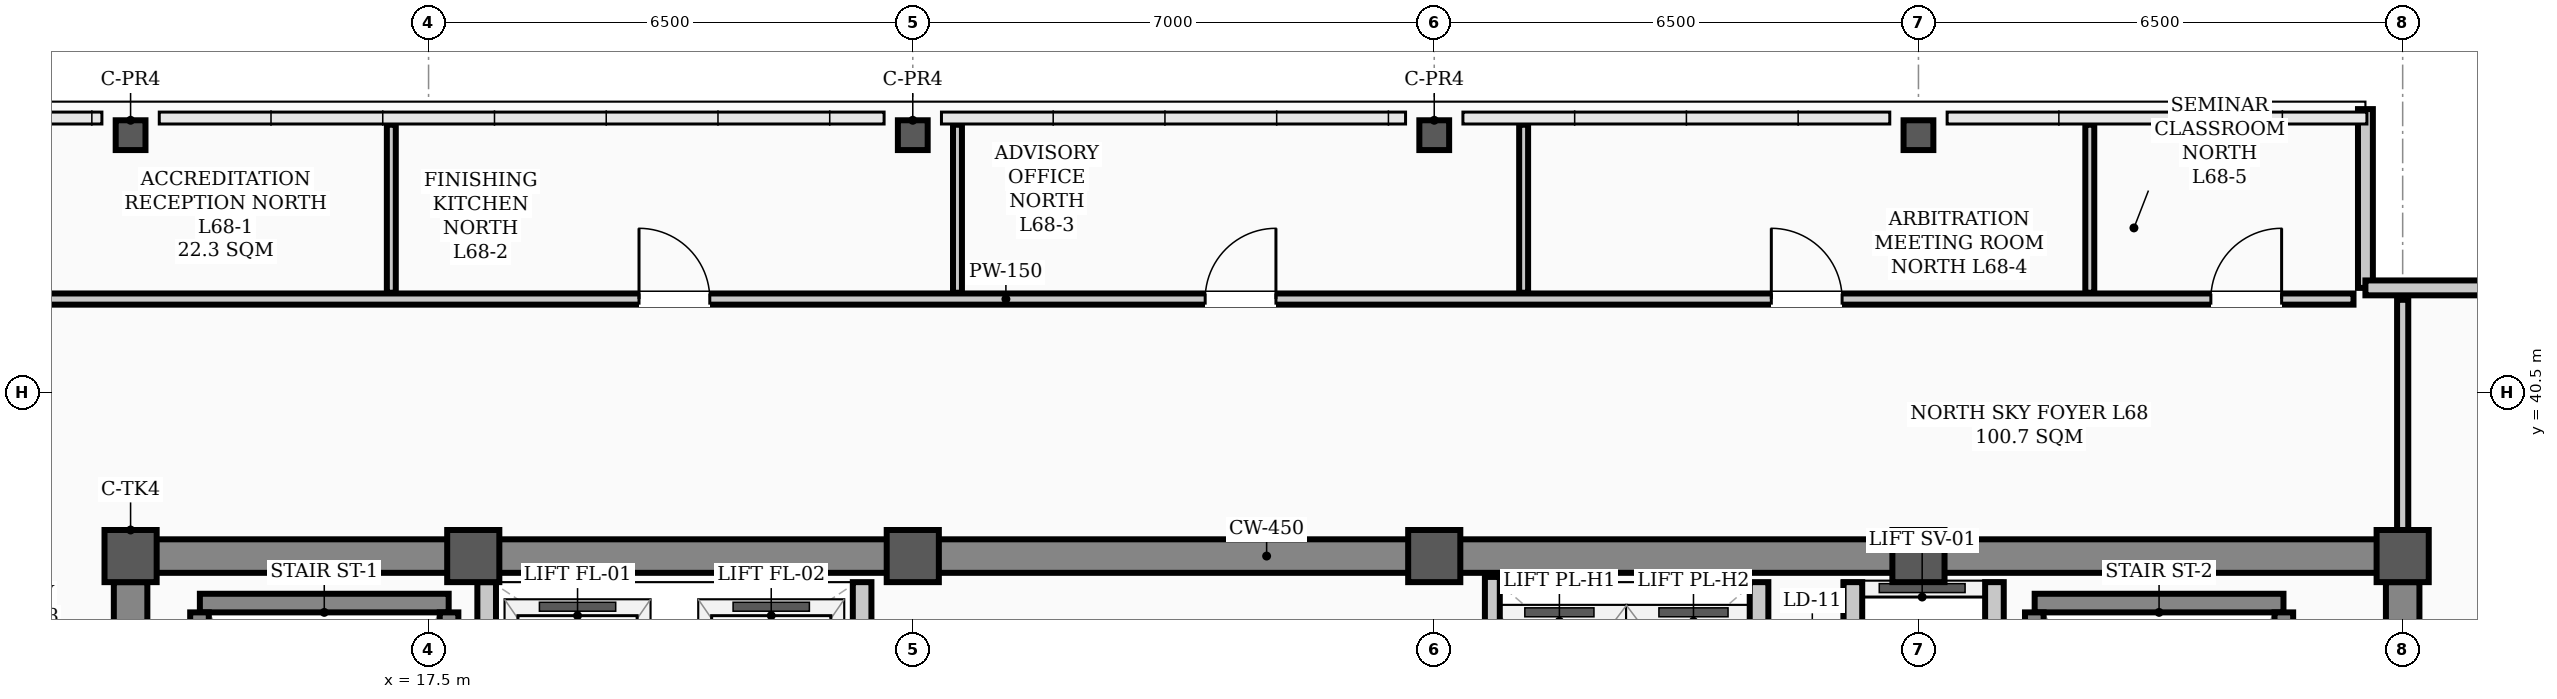
"""IFC4 building model, lengths in metres.
Left out: names, types, materials, properties, quantities, classifications, styles, units other than length and angle.
Written with IfcOpenShell. Run it as: python <this file> out.ifc"""

import sys

from ifc_helpers import new_model, si_unit, direction, frame, frame_2d, origin, origin_2d, place, context, subcontext, project, spatial, rectangle, hollow_rectangle, extrude, element, fill, save


model = new_model("IFC4")
c1 = context("Model", 3, precision=1e-05, world=origin(), true_north=direction((0.0, 1.0)))
c2 = subcontext(c1, "Body", "Model", "MODEL_VIEW")
j1 = project(units=[si_unit("LENGTHUNIT", "METRE"), si_unit("PLANEANGLEUNIT", "RADIAN")], contexts=[c1])
p1 = place(None, origin())
s1 = spatial("IfcSite", under=j1, at=p1, CompositionType="ELEMENT")
p2 = place(p1, origin())
s2 = spatial("IfcBuilding", under=s1, at=p2, CompositionType="ELEMENT")
p3 = place(p2, frame((0.0, 0.0, 273.5)))
s3 = spatial("IfcBuildingStorey", under=s2, at=p3, CompositionType="ELEMENT", Elevation=273.5)
for number, where, z_axis, x_axis in (
    (1, (13.5, 38.3, 0.0), (0.0, 0.0, 1.0), (1.0, 0.0, 0.0)),
    (2, (18.1, 38.3, 0.0), (0.0, 0.0, 1.0), (1.0, 0.0, 0.0)),
    (3, (24.0, 38.3, 0.0), (0.0, 0.0, 1.0), (1.0, 0.0, 0.0)),
    (4, (31.0, 38.3, 0.0), (0.0, 0.0, 1.0), (1.0, 0.0, 0.0)),
    (5, (37.5, 38.3, 0.0), (0.0, 0.0, 1.0), (1.0, 0.0, 0.0)),
    (6, (44.0, 38.3, 0.0), (0.0, 0.0, 1.0), (1.0, 0.0, 0.0)),
):
    element("IfcColumn", number, at=place(p3, frame(where, z_axis=z_axis, x_axis=x_axis)), inside=s3, PredefinedType="COLUMN", context=c2, shape_type="SweptSolid", body=[
        extrude(hollow_rectangle(XDim=0.7, YDim=0.7, WallThickness=0.028, InnerFilletRadius=0.014, OuterFilletRadius=0.042, at=origin_2d()), origin(), (0.0, 0.0, 1.0), 3.9),
    ])
for number, where, z_axis, x_axis in (
    (7, (13.5, 43.95, 0.0), (0.0, 0.0, 1.0), (1.0, 0.0, 0.0)),
    (8, (24.0, 43.95, 0.0), (0.0, 0.0, 1.0), (1.0, 0.0, 0.0)),
    (9, (31.0, 43.95, 0.0), (0.0, 0.0, 1.0), (1.0, 0.0, 0.0)),
    (10, (37.5, 43.95, 0.0), (0.0, 0.0, 1.0), (1.0, 0.0, 0.0)),
):
    element("IfcColumn", number, at=place(p3, frame(where, z_axis=z_axis, x_axis=x_axis)), inside=s3, PredefinedType="COLUMN", context=c2, shape_type="SweptSolid", body=[
        extrude(hollow_rectangle(XDim=0.4, YDim=0.4, WallThickness=0.02, InnerFilletRadius=0.02, OuterFilletRadius=0.04, at=origin_2d()), origin(), (0.0, 0.0, 1.0), 3.9),
    ])
p4 = place(p3, frame((43.5, 44.3, 0.0), z_axis=(0.0, 0.0, 1.0), x_axis=(0.0, -1.0, 0.0)))
e11 = element("IfcWall", 11, at=p4, inside=s3, PredefinedType="PARAPET", context=c2, shape_type="SweptSolid", body=[
    extrude(rectangle(XDim=2.4, YDim=0.2, at=frame_2d((1.2, 0.0))), origin(), (0.0, 0.0, 1.0), 1.2),
])
p5 = place(p3, frame((43.5, 41.9, 0.0), z_axis=(0.0, 0.0, 1.0), x_axis=(1.0, 0.0, 0.0)))
e12 = element("IfcWall", 12, at=p5, inside=s3, PredefinedType="PARAPET", context=c2, shape_type="SweptSolid", body=[
    extrude(rectangle(XDim=2.4, YDim=0.2, at=frame_2d((1.2, 0.0))), origin(), (0.0, 0.0, 1.0), 1.2),
])
p6 = place(p3, frame((13.5, 38.3, 0.0), z_axis=(0.0, 0.0, 1.0), x_axis=(1.0, 0.0, 0.0)))
e13 = element("IfcWall", 13, at=p6, inside=s3, PredefinedType="SHEAR", context=c2, shape_type="SweptSolid", body=[
    extrude(rectangle(XDim=30.5, YDim=0.45, at=frame_2d((15.25, 0.0))), origin(), (0.0, 0.0, 1.0), 3.72),
])
for number, where, z_axis, x_axis in (
    (14, (13.5, 29.35, 0.0), (0.0, 0.0, 1.0), (0.0, 1.0, 0.0)),
    (15, (44.0, 29.35, 0.0), (0.0, 0.0, 1.0), (0.0, 1.0, 0.0)),
):
    element("IfcWall", number, at=place(p3, frame(where, z_axis=z_axis, x_axis=x_axis)), inside=s3, PredefinedType="SHEAR", context=c2, shape_type="SweptSolid", body=[
        extrude(rectangle(XDim=8.6, YDim=0.45, at=frame_2d((4.3, 0.0))), origin(), (0.0, 0.0, 1.0), 3.72),
    ])
p7 = place(p3, frame((14.43, 37.669, 0.0), z_axis=(0.0, 0.0, 1.0), x_axis=(1.0, 0.0, 0.0)))
e16 = element("IfcWall", 16, at=p7, inside=s3, PredefinedType="STANDARD", context=c2, shape_type="SweptSolid", body=[
    extrude(rectangle(XDim=3.34, YDim=0.25, at=frame_2d((1.67, 0.0))), origin(), (0.0, 0.0, 1.0), 3.72),
])
for number, where, z_axis, x_axis in (
    (17, (14.425, 30.36, 0.0), (0.0, 0.0, 1.0), (0.0, 1.0, 0.0)),
    (18, (17.775, 30.36, 0.0), (0.0, 0.0, 1.0), (0.0, 1.0, 0.0)),
):
    element("IfcWall", number, at=place(p3, frame(where, z_axis=z_axis, x_axis=x_axis)), inside=s3, PredefinedType="STANDARD", context=c2, shape_type="SweptSolid", body=[
        extrude(rectangle(XDim=7.184, YDim=0.25, at=frame_2d((3.592, 0.0))), origin(), (0.0, 0.0, 1.0), 3.72),
    ])
p8 = place(p3, frame((39.06, 37.669, 0.0), z_axis=(0.0, 0.0, 1.0), x_axis=(1.0, 0.0, 0.0)))
e19 = element("IfcWall", 19, at=p8, inside=s3, PredefinedType="STANDARD", context=c2, shape_type="SweptSolid", body=[
    extrude(rectangle(XDim=3.34, YDim=0.25, at=frame_2d((1.67, 0.0))), origin(), (0.0, 0.0, 1.0), 3.72),
])
for number, where, z_axis, x_axis in (
    (20, (39.055, 30.36, 0.0), (0.0, 0.0, 1.0), (0.0, 1.0, 0.0)),
    (21, (42.405, 30.36, 0.0), (0.0, 0.0, 1.0), (0.0, 1.0, 0.0)),
):
    element("IfcWall", number, at=place(p3, frame(where, z_axis=z_axis, x_axis=x_axis)), inside=s3, PredefinedType="STANDARD", context=c2, shape_type="SweptSolid", body=[
        extrude(rectangle(XDim=7.184, YDim=0.25, at=frame_2d((3.592, 0.0))), origin(), (0.0, 0.0, 1.0), 3.72),
    ])
p9 = place(p3, frame((36.62, 31.95, 0.0), z_axis=(0.0, 0.0, 1.0), x_axis=(0.0, 1.0, 0.0)))
e22 = element("IfcWall", 22, at=p9, inside=s3, PredefinedType="STANDARD", context=c2, shape_type="SweptSolid", body=[
    extrude(rectangle(XDim=6.0, YDim=0.25, at=frame_2d((3.0, 0.0))), origin(), (0.0, 0.0, 1.0), 3.4),
])
p10 = place(p9, frame((0.9, 0.0, 0.0)))
e23 = element("IfcOpeningElement", 23, at=p10, cuts=e22, PredefinedType="OPENING", context=c2, shape_type="SweptSolid", body=[
    extrude(rectangle(XDim=1.1, YDim=2.08, at=frame_2d((0.55, 1.04))), frame((0.0, 0.135, 0.0), z_axis=(0.0, -1.0, 0.0), x_axis=(1.0, 0.0, 0.0)), (0.0, 0.0, 1.0), 0.27),
])
p11 = place(p9, frame((4.0, 0.0, 0.0)))
e24 = element("IfcOpeningElement", 24, at=p11, cuts=e22, PredefinedType="OPENING", context=c2, shape_type="SweptSolid", body=[
    extrude(rectangle(XDim=1.1, YDim=2.08, at=frame_2d((0.55, 1.04))), frame((0.0, 0.135, 0.0), z_axis=(0.0, -1.0, 0.0), x_axis=(1.0, 0.0, 0.0)), (0.0, 0.0, 1.0), 0.27),
])
p12 = place(p3, frame((38.52, 31.95, 0.0), z_axis=(0.0, 0.0, 1.0), x_axis=(0.0, 1.0, 0.0)))
e25 = element("IfcWall", 25, at=p12, inside=s3, PredefinedType="STANDARD", context=c2, shape_type="SweptSolid", body=[
    extrude(rectangle(XDim=6.0, YDim=0.25, at=frame_2d((3.0, 0.0))), origin(), (0.0, 0.0, 1.0), 3.48),
])
for number, where, z_axis, x_axis in (
    (26, (18.28, 34.62, 0.0), (0.0, 0.0, 1.0), (0.0, 1.0, 0.0)),
    (27, (23.32, 34.62, 0.0), (0.0, 0.0, 1.0), (0.0, 1.0, 0.0)),
):
    element("IfcWall", number, at=place(p3, frame(where, z_axis=z_axis, x_axis=x_axis)), inside=s3, PredefinedType="STANDARD", context=c2, shape_type="SweptSolid", body=[
        extrude(rectangle(XDim=3.33, YDim=0.25, at=frame_2d((1.665, 0.0))), origin(), (0.0, 0.0, 1.0), 3.4),
    ])
p13 = place(p3, frame((35.36, 34.9, 0.0), z_axis=(0.0, 0.0, 1.0), x_axis=(0.0, 1.0, 0.0)))
e28 = element("IfcWall", 28, at=p13, inside=s3, PredefinedType="STANDARD", context=c2, shape_type="SweptSolid", body=[
    extrude(rectangle(XDim=3.05, YDim=0.25, at=frame_2d((1.525, 0.0))), origin(), (0.0, 0.0, 1.0), 3.4),
])
p14 = place(p3, frame((7.16, 41.75, 0.0), z_axis=(0.0, 0.0, 1.0), x_axis=(1.0, 0.0, 0.0)))
e29 = element("IfcWall", 29, at=p14, inside=s3, PredefinedType="PARTITIONING", context=c2, shape_type="SweptSolid", body=[
    extrude(rectangle(XDim=36.18, YDim=0.15, at=frame_2d((18.09, 0.0))), origin(), (0.0, 0.0, 1.0), 3.2),
])
p15 = place(p14, frame((3.855, 0.0, 0.0)))
e30 = element("IfcOpeningElement", 30, at=p15, cuts=e29, PredefinedType="OPENING", context=c2, shape_type="SweptSolid", body=[
    extrude(rectangle(XDim=0.95, YDim=2.08, at=frame_2d((0.475, 1.04))), frame((0.0, 0.085, 0.0), z_axis=(0.0, -1.0, 0.0), x_axis=(1.0, 0.0, 0.0)), (0.0, 0.0, 1.0), 0.17),
])
p16 = place(p14, frame((13.165, 0.0, 0.0)))
e31 = element("IfcOpeningElement", 31, at=p16, cuts=e29, PredefinedType="OPENING", context=c2, shape_type="SweptSolid", body=[
    extrude(rectangle(XDim=0.95, YDim=2.08, at=frame_2d((0.475, 1.04))), frame((0.0, 0.085, 0.0), z_axis=(0.0, -1.0, 0.0), x_axis=(1.0, 0.0, 0.0)), (0.0, 0.0, 1.0), 0.17),
])
p17 = place(p14, frame((20.765, 0.0, 0.0)))
e32 = element("IfcOpeningElement", 32, at=p17, cuts=e29, PredefinedType="OPENING", context=c2, shape_type="SweptSolid", body=[
    extrude(rectangle(XDim=0.95, YDim=2.08, at=frame_2d((0.475, 1.04))), frame((0.0, 0.085, 0.0), z_axis=(0.0, -1.0, 0.0), x_axis=(1.0, 0.0, 0.0)), (0.0, 0.0, 1.0), 0.17),
])
p18 = place(p14, frame((28.365, 0.0, 0.0)))
e33 = element("IfcOpeningElement", 33, at=p18, cuts=e29, PredefinedType="OPENING", context=c2, shape_type="SweptSolid", body=[
    extrude(rectangle(XDim=0.95, YDim=2.08, at=frame_2d((0.475, 1.04))), frame((0.0, 0.085, 0.0), z_axis=(0.0, -1.0, 0.0), x_axis=(1.0, 0.0, 0.0)), (0.0, 0.0, 1.0), 0.17),
])
p19 = place(p14, frame((34.265, 0.0, 0.0)))
e34 = element("IfcOpeningElement", 34, at=p19, cuts=e29, PredefinedType="OPENING", context=c2, shape_type="SweptSolid", body=[
    extrude(rectangle(XDim=0.95, YDim=2.08, at=frame_2d((0.475, 1.04))), frame((0.0, 0.085, 0.0), z_axis=(0.0, -1.0, 0.0), x_axis=(1.0, 0.0, 0.0)), (0.0, 0.0, 1.0), 0.17),
])
p20 = place(p3, frame((44.0, 38.535, 0.0), z_axis=(0.0, 0.0, 1.0), x_axis=(0.0, 1.0, 0.0)))
e35 = element("IfcWall", 35, at=p20, inside=s3, PredefinedType="PARTITIONING", context=c2, shape_type="SweptSolid", body=[
    extrude(rectangle(XDim=3.205, YDim=0.15, at=frame_2d((1.603, 0.0))), origin(), (0.0, 0.0, 1.0), 2.3),
])
p21 = place(p3, frame((17.0, 41.835, 0.0), z_axis=(0.0, 0.0, 1.0), x_axis=(0.0, 1.0, 0.0)))
e36 = element("IfcWall", 36, at=p21, inside=s3, PredefinedType="PARTITIONING", context=c2, shape_type="SweptSolid", body=[
    extrude(rectangle(XDim=2.255, YDim=0.12, at=frame_2d((1.127, 0.0))), origin(), (0.0, 0.0, 1.0), 3.212),
])
p22 = place(p3, frame((24.6, 41.835, 0.0), z_axis=(0.0, 0.0, 1.0), x_axis=(0.0, 1.0, 0.0)))
e37 = element("IfcWall", 37, at=p22, inside=s3, PredefinedType="PARTITIONING", context=c2, shape_type="SweptSolid", body=[
    extrude(rectangle(XDim=2.255, YDim=0.12, at=frame_2d((1.127, 0.0))), origin(), (0.0, 0.0, 1.0), 3.2),
])
p23 = place(p3, frame((32.2, 41.835, 0.0), z_axis=(0.0, 0.0, 1.0), x_axis=(0.0, 1.0, 0.0)))
e38 = element("IfcWall", 38, at=p23, inside=s3, PredefinedType="PARTITIONING", context=c2, shape_type="SweptSolid", body=[
    extrude(rectangle(XDim=2.255, YDim=0.12, at=frame_2d((1.127, 0.0))), origin(), (0.0, 0.0, 1.0), 3.212),
])
p24 = place(p3, frame((39.8, 41.835, 0.0), z_axis=(0.0, 0.0, 1.0), x_axis=(0.0, 1.0, 0.0)))
e39 = element("IfcWall", 39, at=p24, inside=s3, PredefinedType="PARTITIONING", context=c2, shape_type="SweptSolid", body=[
    extrude(rectangle(XDim=2.255, YDim=0.12, at=frame_2d((1.127, 0.0))), origin(), (0.0, 0.0, 1.0), 3.72),
])
p25 = place(p3, frame((31.78, 34.9, 0.0), z_axis=(0.0, 0.0, 1.0), x_axis=(0.0, 1.0, 0.0)))
e40 = element("IfcWall", 40, at=p25, inside=s3, PredefinedType="STANDARD", context=c2, shape_type="SweptSolid", body=[
    extrude(rectangle(XDim=3.12, YDim=0.2, at=frame_2d((1.56, 0.0))), origin(), (0.0, 0.0, 1.0), 3.4),
])
p26 = place(p16, origin())
e41 = element("IfcDoor", 41, at=p26, inside=s3, OperationType="SINGLE_SWING_LEFT", PredefinedType="DOOR", context=c2, shape_type="SweptSolid", body=[
    extrude(rectangle(XDim=0.95, YDim=2.08, at=frame_2d((0.475, 1.04))), frame((0.0, 0.025, 0.0), z_axis=(0.0, -1.0, 0.0), x_axis=(1.0, 0.0, 0.0)), (0.0, 0.0, 1.0), 0.05),
])
fill(e31, e41)
p27 = place(p17, origin())
e42 = element("IfcDoor", 42, at=p27, inside=s3, OperationType="SINGLE_SWING_RIGHT", PredefinedType="DOOR", context=c2, shape_type="SweptSolid", body=[
    extrude(rectangle(XDim=0.95, YDim=2.08, at=frame_2d((0.475, 1.04))), frame((0.0, 0.025, 0.0), z_axis=(0.0, -1.0, 0.0), x_axis=(1.0, 0.0, 0.0)), (0.0, 0.0, 1.0), 0.05),
])
fill(e32, e42)
p28 = place(p18, origin())
e43 = element("IfcDoor", 43, at=p28, inside=s3, OperationType="SINGLE_SWING_LEFT", PredefinedType="DOOR", context=c2, shape_type="SweptSolid", body=[
    extrude(rectangle(XDim=0.95, YDim=2.08, at=frame_2d((0.475, 1.04))), frame((0.0, 0.025, 0.0), z_axis=(0.0, -1.0, 0.0), x_axis=(1.0, 0.0, 0.0)), (0.0, 0.0, 1.0), 0.05),
])
fill(e33, e43)
p29 = place(p19, origin())
e44 = element("IfcDoor", 44, at=p29, inside=s3, OperationType="SINGLE_SWING_RIGHT", PredefinedType="DOOR", context=c2, shape_type="SweptSolid", body=[
    extrude(rectangle(XDim=0.95, YDim=2.08, at=frame_2d((0.475, 1.04))), frame((0.0, 0.025, 0.0), z_axis=(0.0, -1.0, 0.0), x_axis=(1.0, 0.0, 0.0)), (0.0, 0.0, 1.0), 0.05),
])
fill(e34, e44)
save(model, sys.argv[1])
